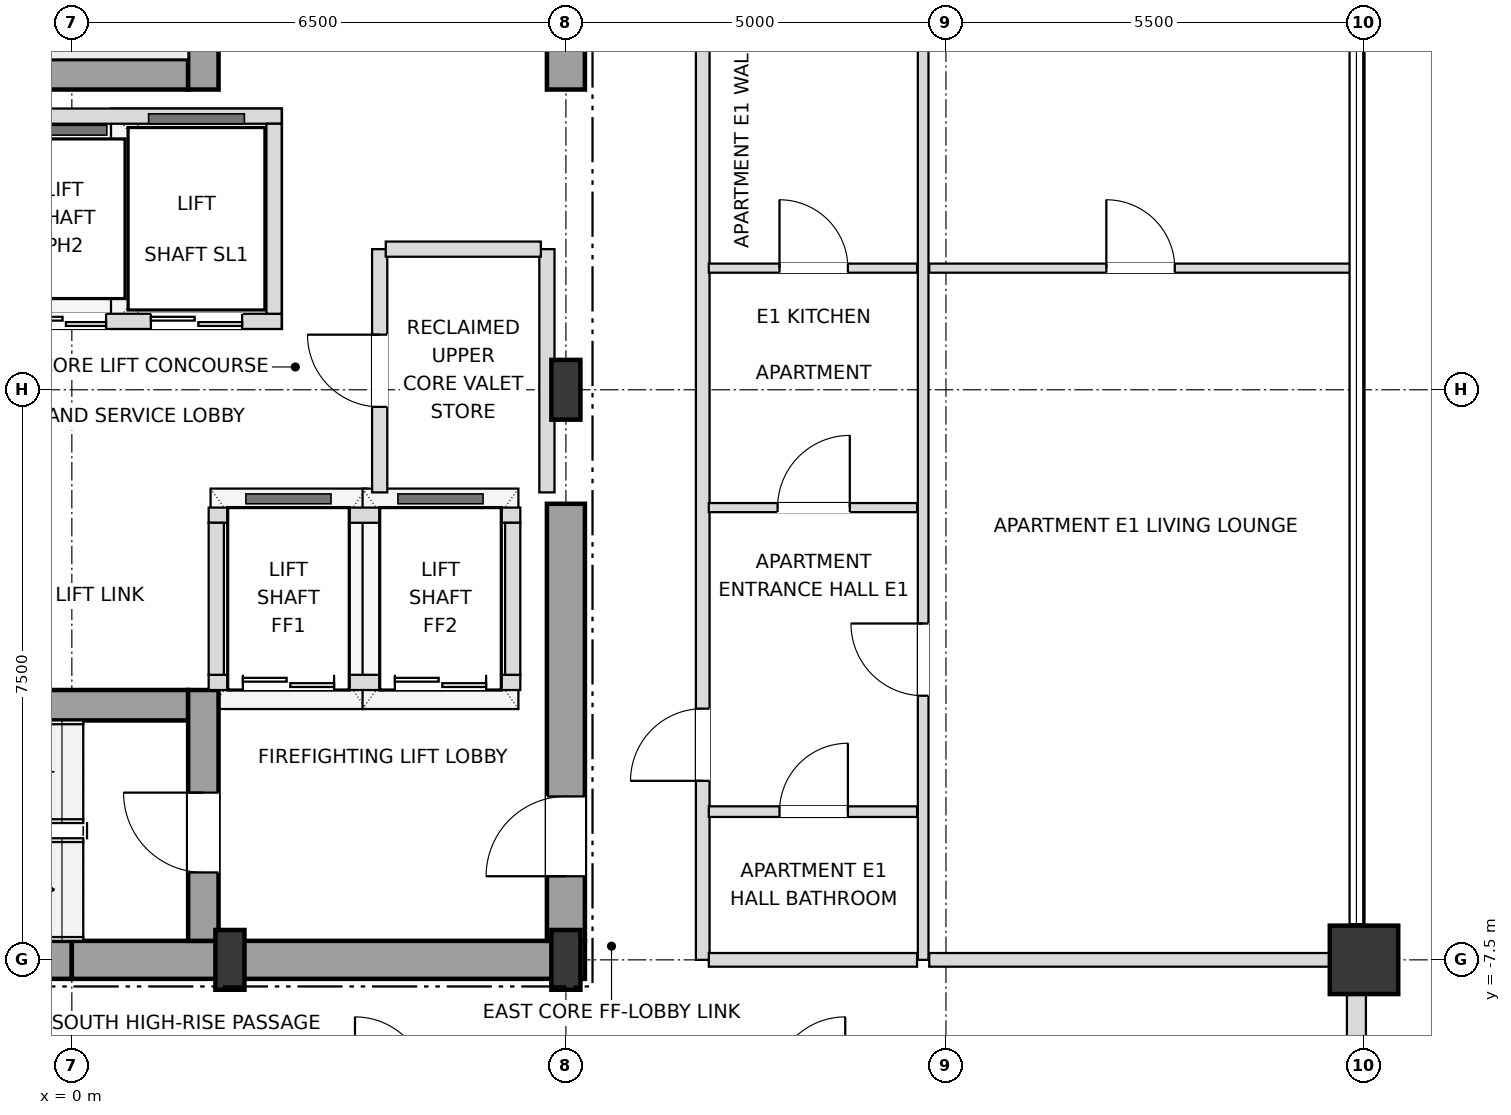
"""IFC4 building model, lengths in metres.
Left out: names, types, materials, properties, quantities, classifications, styles, units other than length and angle.
Written with IfcOpenShell. Run it as: python <this file> out.ifc"""

import sys

from ifc_helpers import new_model, si_unit, direction, frame, frame_2d, origin, origin_2d, place, context, subcontext, project, spatial, rectangle, i_section, extrude, element, fill, save


model = new_model("IFC4")
c1 = context("Model", 3, precision=1e-05, world=origin(), true_north=direction((0.0, 1.0)))
c2 = subcontext(c1, "Body", "Model", "MODEL_VIEW")
j1 = project(units=[si_unit("LENGTHUNIT", "METRE"), si_unit("PLANEANGLEUNIT", "RADIAN")], contexts=[c1])
p1 = place(None, origin())
s1 = spatial("IfcSite", under=j1, at=p1, CompositionType="ELEMENT")
p2 = place(p1, origin())
s2 = spatial("IfcBuilding", under=s1, at=p2, CompositionType="ELEMENT")
p3 = place(p2, frame((0.0, 0.0, 279.9)))
s3 = spatial("IfcBuildingStorey", under=s2, at=p3, CompositionType="ELEMENT", Elevation=279.9)
for number, where, z_axis, x_axis in (
    (1, (2.08, -7.5, 0.0), (0.0, 0.0, 1.0), (1.0, 0.0, 0.0)),
    (2, (6.5, -7.5, 0.0), (0.0, 0.0, 1.0), (1.0, 0.0, 0.0)),
    (3, (6.5, 0.0, 0.0), (0.0, 0.0, 1.0), (1.0, 0.0, 0.0)),
):
    element("IfcColumn", number, at=place(p3, frame(where, z_axis=z_axis, x_axis=x_axis)), inside=s3, PredefinedType="COLUMN", context=c2, shape_type="SweptSolid", body=[
        extrude(i_section(OverallWidth=0.382, OverallDepth=0.786, WebThickness=0.02, FlangeThickness=0.033, at=origin_2d()), origin(), (0.0, 0.0, 1.0), 3.6),
    ])
p4 = place(p3, frame((17.0, -7.5, 0.0), z_axis=(0.0, 0.0, 1.0), x_axis=(1.0, 0.0, 0.0)))
e4 = element("IfcColumn", 4, at=p4, inside=s3, PredefinedType="USERDEFINED", context=c2, shape_type="SweptSolid", body=[
    extrude(rectangle(XDim=0.9, YDim=0.9, at=origin_2d()), origin(), (0.0, 0.0, 1.0), 3.6),
])
p5 = place(p3, frame((16.9, -12.555, 0.0), z_axis=(0.0, 0.0, 1.0), x_axis=(0.0, 1.0, 0.0)))
e5 = element("IfcWall", 5, at=p5, inside=s3, PredefinedType="SOLIDWALL", context=c2, shape_type="SweptSolid", body=[
    extrude(rectangle(XDim=4.61, YDim=0.25, at=frame_2d((2.305, 0.0))), origin(), (0.0, 0.0, 1.0), 2.748),
])
p6 = place(p5, frame((1.405, 0.0, 0.72)))
e6 = element("IfcOpeningElement", 6, at=p6, cuts=e5, PredefinedType="OPENING", context=c2, shape_type="SweptSolid", body=[
    extrude(rectangle(XDim=1.8, YDim=1.68, at=frame_2d((0.9, 0.84))), frame((0.0, 0.135, 0.0), z_axis=(0.0, -1.0, 0.0), x_axis=(1.0, 0.0, 0.0)), (0.0, 0.0, 1.0), 0.27),
])
for number, where, z_axis, x_axis in (
    (7, (-6.75, -7.5, 0.0), (0.0, 0.0, 1.0), (1.0, 0.0, 0.0)),
    (8, (0.0, -7.5, 0.0), (0.0, 0.0, 1.0), (1.0, 0.0, 0.0)),
):
    element("IfcWall", number, at=place(p3, frame(where, z_axis=z_axis, x_axis=x_axis)), inside=s3, PredefinedType="SHEAR", context=c2, shape_type="SweptSolid", body=[
        extrude(rectangle(XDim=6.75, YDim=0.5, at=frame_2d((3.375, 0.0))), origin(), (0.0, 0.0, 1.0), 3.38),
    ])
p7 = place(p3, frame((6.5, -7.25, 0.0), z_axis=(0.0, 0.0, 1.0), x_axis=(0.0, 1.0, 0.0)))
e9 = element("IfcWall", 9, at=p7, inside=s3, PredefinedType="SHEAR", context=c2, shape_type="SweptSolid", body=[
    extrude(rectangle(XDim=5.75, YDim=0.5, at=frame_2d((2.875, 0.0))), origin(), (0.0, 0.0, 1.0), 3.38),
])
p8 = place(p7, frame((0.85, 0.0, 0.0)))
e10 = element("IfcOpeningElement", 10, at=p8, cuts=e9, PredefinedType="OPENING", context=c2, shape_type="SweptSolid", body=[
    extrude(rectangle(XDim=1.05, YDim=2.15, at=frame_2d((0.525, 1.075))), frame((0.0, 0.26, 0.0), z_axis=(0.0, -1.0, 0.0), x_axis=(1.0, 0.0, 0.0)), (0.0, 0.0, 1.0), 0.52),
])
p9 = place(p3, frame((6.5, 3.95, 0.0), z_axis=(0.0, 0.0, 1.0), x_axis=(0.0, 1.0, 0.0)))
e11 = element("IfcWall", 11, at=p9, inside=s3, PredefinedType="SHEAR", context=c2, shape_type="SweptSolid", body=[
    extrude(rectangle(XDim=3.3, YDim=0.5, at=frame_2d((1.65, 0.0))), origin(), (0.0, 0.0, 1.0), 3.38),
])
p10 = place(p3, frame((-6.25, -4.15, 0.0), z_axis=(0.0, 0.0, 1.0), x_axis=(1.0, 0.0, 0.0)))
e12 = element("IfcWall", 12, at=p10, inside=s3, PredefinedType="SHEAR", context=c2, shape_type="SweptSolid", body=[
    extrude(rectangle(XDim=7.78, YDim=0.4, at=frame_2d((3.89, 0.0))), origin(), (0.0, 0.0, 1.0), 3.38),
])
p11 = place(p3, frame((1.73, -7.25, 0.0), z_axis=(0.0, 0.0, 1.0), x_axis=(0.0, 1.0, 0.0)))
e13 = element("IfcWall", 13, at=p11, inside=s3, PredefinedType="SHEAR", context=c2, shape_type="SweptSolid", body=[
    extrude(rectangle(XDim=3.3, YDim=0.4, at=frame_2d((1.65, 0.0))), origin(), (0.0, 0.0, 1.0), 3.38),
])
p12 = place(p11, frame((0.9, 0.0, 0.0)))
e14 = element("IfcOpeningElement", 14, at=p12, cuts=e13, PredefinedType="OPENING", context=c2, shape_type="SweptSolid", body=[
    extrude(rectangle(XDim=1.05, YDim=2.15, at=frame_2d((0.525, 1.075))), frame((0.0, 0.21, 0.0), z_axis=(0.0, -1.0, 0.0), x_axis=(1.0, 0.0, 0.0)), (0.0, 0.0, 1.0), 0.42),
])
p13 = place(p3, frame((-5.55, 4.15, 0.0), z_axis=(0.0, 0.0, 1.0), x_axis=(1.0, 0.0, 0.0)))
e15 = element("IfcWall", 15, at=p13, inside=s3, PredefinedType="SHEAR", context=c2, shape_type="SweptSolid", body=[
    extrude(rectangle(XDim=7.08, YDim=0.4, at=frame_2d((3.54, 0.0))), origin(), (0.0, 0.0, 1.0), 3.38),
])
p14 = place(p3, frame((1.73, 3.95, 0.0), z_axis=(0.0, 0.0, 1.0), x_axis=(0.0, 1.0, 0.0)))
e16 = element("IfcWall", 16, at=p14, inside=s3, PredefinedType="SHEAR", context=c2, shape_type="SweptSolid", body=[
    extrude(rectangle(XDim=3.3, YDim=0.4, at=frame_2d((1.65, 0.0))), origin(), (0.0, 0.0, 1.0), 3.38),
])
p15 = place(p3, frame((-2.82, 0.9, 0.0), z_axis=(0.0, 0.0, 1.0), x_axis=(1.0, 0.0, 0.0)))
e17 = element("IfcWall", 17, at=p15, inside=s3, PredefinedType="SOLIDWALL", context=c2, shape_type="SweptSolid", body=[
    extrude(rectangle(XDim=5.58, YDim=0.2, at=frame_2d((2.79, 0.0))), origin(), (0.0, 0.0, 1.0), 3.38),
])
p16 = place(p15, frame((0.49, 0.0, 0.0)))
e18 = element("IfcOpeningElement", 18, at=p16, cuts=e17, PredefinedType="OPENING", context=c2, shape_type="SweptSolid", body=[
    extrude(rectangle(XDim=1.1, YDim=2.15, at=frame_2d((0.55, 1.075))), frame((0.0, 0.11, 0.0), z_axis=(0.0, -1.0, 0.0), x_axis=(1.0, 0.0, 0.0)), (0.0, 0.0, 1.0), 0.22),
])
p17 = place(p15, frame((2.17, 0.0, 0.0)))
e19 = element("IfcOpeningElement", 19, at=p17, cuts=e17, PredefinedType="OPENING", context=c2, shape_type="SweptSolid", body=[
    extrude(rectangle(XDim=1.1, YDim=2.15, at=frame_2d((0.55, 1.075))), frame((0.0, 0.11, 0.0), z_axis=(0.0, -1.0, 0.0), x_axis=(1.0, 0.0, 0.0)), (0.0, 0.0, 1.0), 0.22),
])
p18 = place(p15, frame((3.86, 0.0, 0.0)))
e20 = element("IfcOpeningElement", 20, at=p18, cuts=e17, PredefinedType="OPENING", context=c2, shape_type="SweptSolid", body=[
    extrude(rectangle(XDim=1.2, YDim=2.2, at=frame_2d((0.6, 1.1))), frame((0.0, 0.11, 0.0), z_axis=(0.0, -1.0, 0.0), x_axis=(1.0, 0.0, 0.0)), (0.0, 0.0, 1.0), 0.22),
])
p19 = place(p3, frame((-2.82, 3.6, 0.0), z_axis=(0.0, 0.0, 1.0), x_axis=(1.0, 0.0, 0.0)))
e21 = element("IfcWall", 21, at=p19, inside=s3, PredefinedType="SOLIDWALL", context=c2, shape_type="SweptSolid", body=[
    extrude(rectangle(XDim=5.58, YDim=0.2, at=frame_2d((2.79, 0.0))), origin(), (0.0, 0.0, 1.0), 3.38),
])
p20 = place(p3, frame((2.66, 1.0, 0.0), z_axis=(0.0, 0.0, 1.0), x_axis=(0.0, 1.0, 0.0)))
e22 = element("IfcWall", 22, at=p20, inside=s3, PredefinedType="SOLIDWALL", context=c2, shape_type="SweptSolid", body=[
    extrude(rectangle(XDim=2.5, YDim=0.2, at=frame_2d((1.25, 0.0))), origin(), (0.0, 0.0, 1.0), 3.38),
])
p21 = place(p3, frame((1.8, -3.85, 0.0), z_axis=(0.0, 0.0, 1.0), x_axis=(1.0, 0.0, 0.0)))
e23 = element("IfcWall", 23, at=p21, inside=s3, PredefinedType="SOLIDWALL", context=c2, shape_type="SweptSolid", body=[
    extrude(rectangle(XDim=4.1, YDim=0.2, at=frame_2d((2.05, 0.0))), origin(), (0.0, 0.0, 1.0), 3.38),
])
p22 = place(p21, frame((0.45, 0.0, 0.0)))
e24 = element("IfcOpeningElement", 24, at=p22, cuts=e23, PredefinedType="OPENING", context=c2, shape_type="SweptSolid", body=[
    extrude(rectangle(XDim=1.2, YDim=2.2, at=frame_2d((0.6, 1.1))), frame((0.0, 0.11, 0.0), z_axis=(0.0, -1.0, 0.0), x_axis=(1.0, 0.0, 0.0)), (0.0, 0.0, 1.0), 0.22),
])
p23 = place(p21, frame((2.45, 0.0, 0.0)))
e25 = element("IfcOpeningElement", 25, at=p23, cuts=e23, PredefinedType="OPENING", context=c2, shape_type="SweptSolid", body=[
    extrude(rectangle(XDim=1.2, YDim=2.2, at=frame_2d((0.6, 1.1))), frame((0.0, 0.11, 0.0), z_axis=(0.0, -1.0, 0.0), x_axis=(1.0, 0.0, 0.0)), (0.0, 0.0, 1.0), 0.22),
])
p24 = place(p3, frame((1.8, -1.65, 0.0), z_axis=(0.0, 0.0, 1.0), x_axis=(1.0, 0.0, 0.0)))
e26 = element("IfcWall", 26, at=p24, inside=s3, PredefinedType="SOLIDWALL", context=c2, shape_type="SweptSolid", body=[
    extrude(rectangle(XDim=4.1, YDim=0.2, at=frame_2d((2.05, 0.0))), origin(), (0.0, 0.0, 1.0), 3.38),
])
for number, where, z_axis, x_axis in (
    (27, (1.9, -3.75, 0.0), (0.0, 0.0, 1.0), (0.0, 1.0, 0.0)),
    (28, (5.8, -3.75, 0.0), (0.0, 0.0, 1.0), (0.0, 1.0, 0.0)),
):
    element("IfcWall", number, at=place(p3, frame(where, z_axis=z_axis, x_axis=x_axis)), inside=s3, PredefinedType="SOLIDWALL", context=c2, shape_type="SweptSolid", body=[
        extrude(rectangle(XDim=2.0, YDim=0.2, at=frame_2d((1.0, 0.0))), origin(), (0.0, 0.0, 1.0), 3.38),
    ])
p25 = place(p3, frame((4.05, -1.35, 0.0), z_axis=(0.0, 0.0, 1.0), x_axis=(0.0, 1.0, 0.0)))
e29 = element("IfcWall", 29, at=p25, inside=s3, PredefinedType="SOLIDWALL", context=c2, shape_type="SweptSolid", body=[
    extrude(rectangle(XDim=3.2, YDim=0.2, at=frame_2d((1.6, 0.0))), origin(), (0.0, 0.0, 1.0), 3.38),
])
p26 = place(p25, frame((1.125, 0.0, 0.0)))
e30 = element("IfcOpeningElement", 30, at=p26, cuts=e29, PredefinedType="OPENING", context=c2, shape_type="SweptSolid", body=[
    extrude(rectangle(XDim=0.95, YDim=2.15, at=frame_2d((0.475, 1.075))), frame((0.0, 0.11, 0.0), z_axis=(0.0, -1.0, 0.0), x_axis=(1.0, 0.0, 0.0)), (0.0, 0.0, 1.0), 0.22),
])
p27 = place(p3, frame((6.25, -1.35, 0.0), z_axis=(0.0, 0.0, 1.0), x_axis=(0.0, 1.0, 0.0)))
e31 = element("IfcWall", 31, at=p27, inside=s3, PredefinedType="SOLIDWALL", context=c2, shape_type="SweptSolid", body=[
    extrude(rectangle(XDim=3.2, YDim=0.2, at=frame_2d((1.6, 0.0))), origin(), (0.0, 0.0, 1.0), 3.38),
])
p28 = place(p3, frame((8.3, -7.5, 0.0), z_axis=(0.0, 0.0, 1.0), x_axis=(0.0, 1.0, 0.0)))
e32 = element("IfcWall", 32, at=p28, inside=s3, PredefinedType="PARTITIONING", context=c2, shape_type="SweptSolid", body=[
    extrude(rectangle(XDim=15.0, YDim=0.18, at=frame_2d((7.5, 0.0))), origin(), (0.0, 0.0, 1.0), 3.38),
])
p29 = place(p28, frame((2.355, 0.0, 0.0)))
e33 = element("IfcOpeningElement", 33, at=p29, cuts=e32, PredefinedType="OPENING", context=c2, shape_type="SweptSolid", body=[
    extrude(rectangle(XDim=0.95, YDim=2.15, at=frame_2d((0.475, 1.075))), frame((0.0, 0.1, 0.0), z_axis=(0.0, -1.0, 0.0), x_axis=(1.0, 0.0, 0.0)), (0.0, 0.0, 1.0), 0.2),
])
p30 = place(p3, frame((11.2, -7.5, 0.0), z_axis=(0.0, 0.0, 1.0), x_axis=(0.0, 1.0, 0.0)))
e34 = element("IfcWall", 34, at=p30, inside=s3, PredefinedType="PARTITIONING", context=c2, shape_type="SweptSolid", body=[
    extrude(rectangle(XDim=15.0, YDim=0.14, at=frame_2d((7.5, 0.0))), origin(), (0.0, 0.0, 1.0), 3.38),
])
p31 = place(p30, frame((3.475, 0.0, 0.0)))
e35 = element("IfcOpeningElement", 35, at=p31, cuts=e34, PredefinedType="OPENING", context=c2, shape_type="SweptSolid", body=[
    extrude(rectangle(XDim=0.95, YDim=2.1, at=frame_2d((0.475, 1.05))), frame((0.0, 0.08, 0.0), z_axis=(0.0, -1.0, 0.0), x_axis=(1.0, 0.0, 0.0)), (0.0, 0.0, 1.0), 0.16),
])
p32 = place(p3, frame((8.38, -7.5, 0.0), z_axis=(0.0, 0.0, 1.0), x_axis=(1.0, 0.0, 0.0)))
e36 = element("IfcWall", 36, at=p32, inside=s3, PredefinedType="PARTITIONING", context=c2, shape_type="SweptSolid", body=[
    extrude(rectangle(XDim=2.74, YDim=0.18, at=frame_2d((1.37, 0.0))), origin(), (0.0, 0.0, 1.0), 2.826),
])
p33 = place(p3, frame((11.28, -7.5, 0.0), z_axis=(0.0, 0.0, 1.0), x_axis=(1.0, 0.0, 0.0)))
e37 = element("IfcWall", 37, at=p33, inside=s3, PredefinedType="PARTITIONING", context=c2, shape_type="SweptSolid", body=[
    extrude(rectangle(XDim=5.62, YDim=0.18, at=frame_2d((2.81, 0.0))), origin(), (0.0, 0.0, 1.0), 2.826),
])
p34 = place(p3, frame((8.38, -5.55, 0.0), z_axis=(0.0, 0.0, 1.0), x_axis=(1.0, 0.0, 0.0)))
e38 = element("IfcWall", 38, at=p34, inside=s3, PredefinedType="PARTITIONING", context=c2, shape_type="SweptSolid", body=[
    extrude(rectangle(XDim=2.74, YDim=0.14, at=frame_2d((1.37, 0.0))), origin(), (0.0, 0.0, 1.0), 3.38),
])
p35 = place(p34, frame((0.93, 0.0, 0.0)))
e39 = element("IfcOpeningElement", 39, at=p35, cuts=e38, PredefinedType="OPENING", context=c2, shape_type="SweptSolid", body=[
    extrude(rectangle(XDim=0.9, YDim=2.1, at=frame_2d((0.45, 1.05))), frame((0.0, 0.08, 0.0), z_axis=(0.0, -1.0, 0.0), x_axis=(1.0, 0.0, 0.0)), (0.0, 0.0, 1.0), 0.16),
])
p36 = place(p3, frame((8.38, -1.55, 0.0), z_axis=(0.0, 0.0, 1.0), x_axis=(1.0, 0.0, 0.0)))
e40 = element("IfcWall", 40, at=p36, inside=s3, PredefinedType="PARTITIONING", context=c2, shape_type="SweptSolid", body=[
    extrude(rectangle(XDim=2.74, YDim=0.12, at=frame_2d((1.37, 0.0))), origin(), (0.0, 0.0, 1.0), 3.38),
])
p37 = place(p36, frame((0.905, 0.0, 0.0)))
e41 = element("IfcOpeningElement", 41, at=p37, cuts=e40, PredefinedType="OPENING", context=c2, shape_type="SweptSolid", body=[
    extrude(rectangle(XDim=0.95, YDim=2.1, at=frame_2d((0.475, 1.05))), frame((0.0, 0.07, 0.0), z_axis=(0.0, -1.0, 0.0), x_axis=(1.0, 0.0, 0.0)), (0.0, 0.0, 1.0), 0.14),
])
p38 = place(p3, frame((8.38, 1.6, 0.0), z_axis=(0.0, 0.0, 1.0), x_axis=(1.0, 0.0, 0.0)))
e42 = element("IfcWall", 42, at=p38, inside=s3, PredefinedType="PARTITIONING", context=c2, shape_type="SweptSolid", body=[
    extrude(rectangle(XDim=2.74, YDim=0.12, at=frame_2d((1.37, 0.0))), origin(), (0.0, 0.0, 1.0), 3.38),
])
p39 = place(p38, frame((0.93, 0.0, 0.0)))
e43 = element("IfcOpeningElement", 43, at=p39, cuts=e42, PredefinedType="OPENING", context=c2, shape_type="SweptSolid", body=[
    extrude(rectangle(XDim=0.9, YDim=2.1, at=frame_2d((0.45, 1.05))), frame((0.0, 0.07, 0.0), z_axis=(0.0, -1.0, 0.0), x_axis=(1.0, 0.0, 0.0)), (0.0, 0.0, 1.0), 0.14),
])
p40 = place(p3, frame((11.28, 1.6, 0.0), z_axis=(0.0, 0.0, 1.0), x_axis=(1.0, 0.0, 0.0)))
e44 = element("IfcWall", 44, at=p40, inside=s3, PredefinedType="PARTITIONING", context=c2, shape_type="SweptSolid", body=[
    extrude(rectangle(XDim=5.54, YDim=0.12, at=frame_2d((2.77, 0.0))), origin(), (0.0, 0.0, 1.0), 3.018),
])
p41 = place(p40, frame((2.33, 0.0, 0.0)))
e45 = element("IfcOpeningElement", 45, at=p41, cuts=e44, PredefinedType="OPENING", context=c2, shape_type="SweptSolid", body=[
    extrude(rectangle(XDim=0.9, YDim=2.1, at=frame_2d((0.45, 1.05))), frame((0.0, 0.07, 0.0), z_axis=(0.0, -1.0, 0.0), x_axis=(1.0, 0.0, 0.0)), (0.0, 0.0, 1.0), 0.14),
])
p42 = place(p3, frame((4.13, 1.85, 0.0), z_axis=(0.0, 0.0, 1.0), x_axis=(1.0, 0.0, 0.0)))
e46 = element("IfcWall", 46, at=p42, inside=s3, PredefinedType="SOLIDWALL", context=c2, shape_type="SweptSolid", body=[
    extrude(rectangle(XDim=2.04, YDim=0.2, at=frame_2d((1.02, 0.0))), origin(), (0.0, 0.0, 1.0), 3.38),
])
p43 = place(p8, origin())
e47 = element("IfcDoor", 47, at=p43, inside=s3, OperationType="SINGLE_SWING_LEFT", PredefinedType="DOOR", context=c2, shape_type="SweptSolid", body=[
    extrude(rectangle(XDim=1.05, YDim=2.15, at=frame_2d((0.525, 1.075))), frame((0.0, 0.025, 0.0), z_axis=(0.0, -1.0, 0.0), x_axis=(1.0, 0.0, 0.0)), (0.0, 0.0, 1.0), 0.05),
])
fill(e10, e47)
p44 = place(p12, origin())
e48 = element("IfcDoor", 48, at=p44, inside=s3, OperationType="SINGLE_SWING_RIGHT", PredefinedType="DOOR", context=c2, shape_type="SweptSolid", body=[
    extrude(rectangle(XDim=1.05, YDim=2.15, at=frame_2d((0.525, 1.075))), frame((0.0, 0.025, 0.0), z_axis=(0.0, -1.0, 0.0), x_axis=(1.0, 0.0, 0.0)), (0.0, 0.0, 1.0), 0.05),
])
fill(e14, e48)
p45 = place(p17, origin())
e49 = element("IfcDoor", 49, at=p45, inside=s3, OperationType="DOUBLE_DOOR_SLIDING", PredefinedType="DOOR", context=c2, shape_type="SweptSolid", body=[
    extrude(rectangle(XDim=1.1, YDim=2.15, at=frame_2d((0.55, 1.075))), frame((0.0, 0.025, 0.0), z_axis=(0.0, -1.0, 0.0), x_axis=(1.0, 0.0, 0.0)), (0.0, 0.0, 1.0), 0.05),
])
fill(e19, e49)
p46 = place(p18, origin())
e50 = element("IfcDoor", 50, at=p46, inside=s3, OperationType="DOUBLE_DOOR_SLIDING", PredefinedType="DOOR", context=c2, shape_type="SweptSolid", body=[
    extrude(rectangle(XDim=1.2, YDim=2.2, at=frame_2d((0.6, 1.1))), frame((0.0, 0.025, 0.0), z_axis=(0.0, -1.0, 0.0), x_axis=(1.0, 0.0, 0.0)), (0.0, 0.0, 1.0), 0.05),
])
fill(e20, e50)
p47 = place(p22, origin())
e51 = element("IfcDoor", 51, at=p47, inside=s3, OperationType="DOUBLE_DOOR_SLIDING", PredefinedType="DOOR", context=c2, shape_type="SweptSolid", body=[
    extrude(rectangle(XDim=1.2, YDim=2.2, at=frame_2d((0.6, 1.1))), frame((0.0, 0.025, 0.0), z_axis=(0.0, -1.0, 0.0), x_axis=(1.0, 0.0, 0.0)), (0.0, 0.0, 1.0), 0.05),
])
fill(e24, e51)
p48 = place(p23, origin())
e52 = element("IfcDoor", 52, at=p48, inside=s3, OperationType="DOUBLE_DOOR_SLIDING", PredefinedType="DOOR", context=c2, shape_type="SweptSolid", body=[
    extrude(rectangle(XDim=1.2, YDim=2.2, at=frame_2d((0.6, 1.1))), frame((0.0, 0.025, 0.0), z_axis=(0.0, -1.0, 0.0), x_axis=(1.0, 0.0, 0.0)), (0.0, 0.0, 1.0), 0.05),
])
fill(e25, e52)
p49 = place(p26, origin())
e53 = element("IfcDoor", 53, at=p49, inside=s3, OperationType="SINGLE_SWING_RIGHT", PredefinedType="DOOR", context=c2, shape_type="SweptSolid", body=[
    extrude(rectangle(XDim=0.95, YDim=2.15, at=frame_2d((0.475, 1.075))), frame((0.0, 0.025, 0.0), z_axis=(0.0, -1.0, 0.0), x_axis=(1.0, 0.0, 0.0)), (0.0, 0.0, 1.0), 0.05),
])
fill(e30, e53)
p50 = place(p35, origin())
e54 = element("IfcDoor", 54, at=p50, inside=s3, OperationType="SINGLE_SWING_RIGHT", PredefinedType="DOOR", context=c2, shape_type="SweptSolid", body=[
    extrude(rectangle(XDim=0.9, YDim=2.1, at=frame_2d((0.45, 1.05))), frame((0.0, 0.025, 0.0), z_axis=(0.0, -1.0, 0.0), x_axis=(1.0, 0.0, 0.0)), (0.0, 0.0, 1.0), 0.05),
])
fill(e39, e54)
p51 = place(p29, origin())
e55 = element("IfcDoor", 55, at=p51, inside=s3, OperationType="SINGLE_SWING_LEFT", PredefinedType="DOOR", context=c2, shape_type="SweptSolid", body=[
    extrude(rectangle(XDim=0.95, YDim=2.15, at=frame_2d((0.475, 1.075))), frame((0.0, 0.025, 0.0), z_axis=(0.0, -1.0, 0.0), x_axis=(1.0, 0.0, 0.0)), (0.0, 0.0, 1.0), 0.05),
])
fill(e33, e55)
p52 = place(p37, origin())
e56 = element("IfcDoor", 56, at=p52, inside=s3, OperationType="SINGLE_SWING_RIGHT", PredefinedType="DOOR", context=c2, shape_type="SweptSolid", body=[
    extrude(rectangle(XDim=0.95, YDim=2.1, at=frame_2d((0.475, 1.05))), frame((0.0, 0.025, 0.0), z_axis=(0.0, -1.0, 0.0), x_axis=(1.0, 0.0, 0.0)), (0.0, 0.0, 1.0), 0.05),
])
fill(e41, e56)
p53 = place(p39, origin())
e57 = element("IfcDoor", 57, at=p53, inside=s3, OperationType="SINGLE_SWING_LEFT", PredefinedType="DOOR", context=c2, shape_type="SweptSolid", body=[
    extrude(rectangle(XDim=0.9, YDim=2.1, at=frame_2d((0.45, 1.05))), frame((0.0, 0.025, 0.0), z_axis=(0.0, -1.0, 0.0), x_axis=(1.0, 0.0, 0.0)), (0.0, 0.0, 1.0), 0.05),
])
fill(e43, e57)
p54 = place(p31, origin())
e58 = element("IfcDoor", 58, at=p54, inside=s3, OperationType="SINGLE_SWING_RIGHT", PredefinedType="DOOR", context=c2, shape_type="SweptSolid", body=[
    extrude(rectangle(XDim=0.95, YDim=2.1, at=frame_2d((0.475, 1.05))), frame((0.0, 0.025, 0.0), z_axis=(0.0, -1.0, 0.0), x_axis=(1.0, 0.0, 0.0)), (0.0, 0.0, 1.0), 0.05),
])
fill(e35, e58)
p55 = place(p41, origin())
e59 = element("IfcDoor", 59, at=p55, inside=s3, OperationType="SINGLE_SWING_LEFT", PredefinedType="DOOR", context=c2, shape_type="SweptSolid", body=[
    extrude(rectangle(XDim=0.9, YDim=2.1, at=frame_2d((0.45, 1.05))), frame((0.0, 0.025, 0.0), z_axis=(0.0, -1.0, 0.0), x_axis=(1.0, 0.0, 0.0)), (0.0, 0.0, 1.0), 0.05),
])
fill(e45, e59)
save(model, sys.argv[1])
